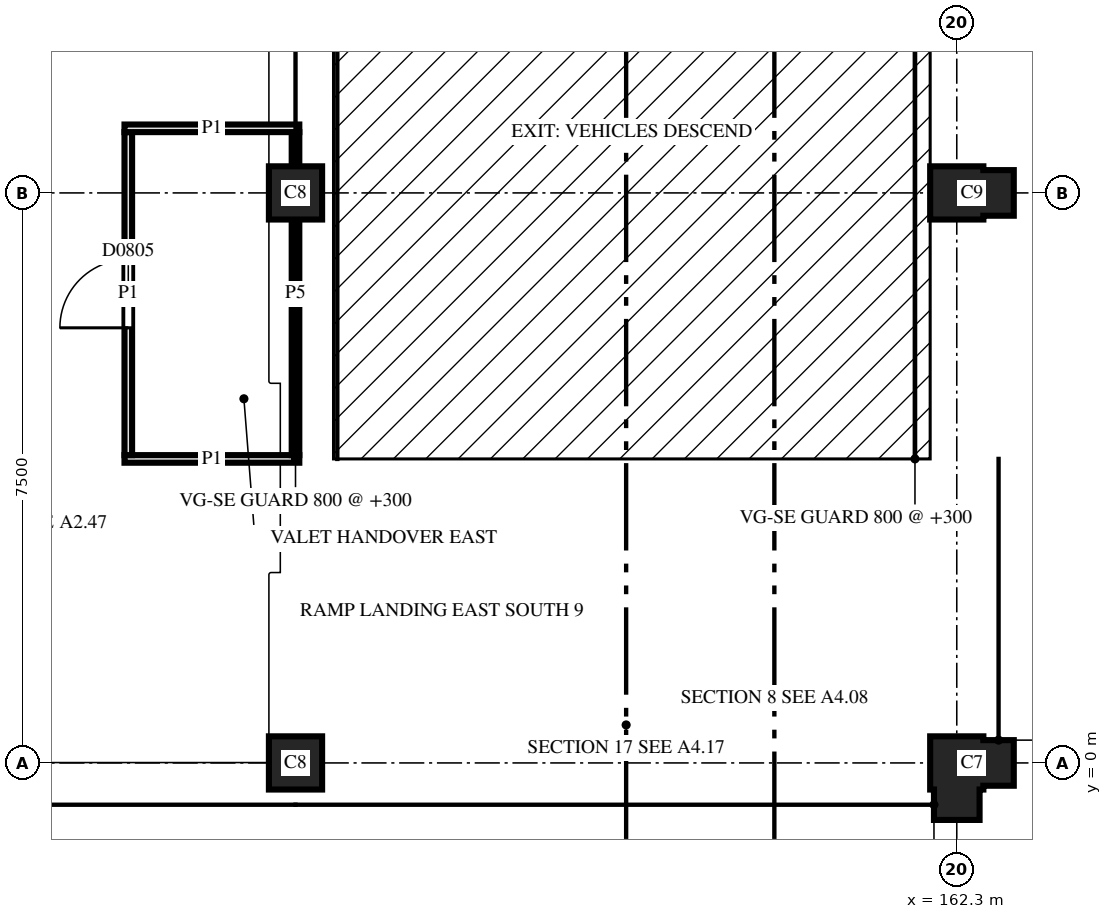
"""IFC4 building model, lengths in metres.
Left out: names, types, materials, properties, quantities, classifications, styles, units other than length and angle.
Written with IfcOpenShell. Run it as: python <this file> out.ifc"""

import sys

from ifc_helpers import new_model, si_unit, direction, frame, frame_2d, origin, place, context, subcontext, project, spatial, polyline, rectangle, outline, extrude, element, fill, save


model = new_model("IFC4")
c1 = context("Model", 3, precision=1e-05, world=origin(), true_north=direction((0.0, 1.0)))
c2 = subcontext(c1, "Body", "Model", "MODEL_VIEW")
j1 = project(units=[si_unit("LENGTHUNIT", "METRE"), si_unit("PLANEANGLEUNIT", "RADIAN")], contexts=[c1])
p1 = place(None, origin())
s1 = spatial("IfcSite", under=j1, at=p1, CompositionType="ELEMENT")
p2 = place(p1, origin())
s2 = spatial("IfcBuilding", under=s1, at=p2, CompositionType="ELEMENT")
p3 = place(p2, frame((0.0, 0.0, 30.4)))
s3 = spatial("IfcBuildingStorey", under=s2, at=p3, CompositionType="ELEMENT", Elevation=30.4)
p4 = place(p3, frame((153.6, 0.0, 0.0), z_axis=(0.0, 0.0, 1.0), x_axis=(1.0, 0.0, 0.0)))
e1 = element("IfcColumn", 1, at=p4, inside=s3, PredefinedType="COLUMN", context=c2, shape_type="SweptSolid", body=[
    extrude(outline(polyline([(-0.35, -0.35), (0.35, -0.35), (0.35, 0.35), (-0.35, 0.35), (-0.35, -0.35)])), origin(), (0.0, 0.0, 1.0), 3.7),
])
p5 = place(p3, frame((162.3, 0.0, 0.0), z_axis=(0.0, 0.0, 1.0), x_axis=(0.0, -1.0, 0.0)))
e2 = element("IfcColumn", 2, at=p5, inside=s3, PredefinedType="COLUMN", context=c2, shape_type="SweptSolid", body=[
    extrude(outline(polyline([(-0.35, -0.35), (0.35, -0.35), (0.35, -0.3), (0.75, -0.3), (0.75, 0.3), (0.35, 0.3), (0.35, 0.35), (0.3, 0.35), (0.3, 0.75), (-0.3, 0.75), (-0.3, 0.35), (-0.35, 0.35), (-0.35, -0.35)])), origin(), (0.0, 0.0, 1.0), 3.7),
])
p6 = place(p3, frame((153.6, 7.5, 0.0), z_axis=(0.0, 0.0, 1.0), x_axis=(1.0, 0.0, 0.0)))
e3 = element("IfcColumn", 3, at=p6, inside=s3, PredefinedType="COLUMN", context=c2, shape_type="SweptSolid", body=[
    extrude(outline(polyline([(-0.35, -0.35), (0.35, -0.35), (0.35, 0.35), (-0.35, 0.35), (-0.35, -0.35)])), origin(), (0.0, 0.0, 1.0), 3.7),
])
p7 = place(p3, frame((162.3, 7.5, 0.0), z_axis=(0.0, 0.0, 1.0), x_axis=(1.0, 0.0, 0.0)))
e4 = element("IfcColumn", 4, at=p7, inside=s3, PredefinedType="COLUMN", context=c2, shape_type="SweptSolid", body=[
    extrude(outline(polyline([(-0.35, -0.35), (0.35, -0.35), (0.35, -0.3), (0.75, -0.3), (0.75, 0.3), (0.35, 0.3), (0.35, 0.35), (-0.35, 0.35), (-0.35, -0.35)])), origin(), (0.0, 0.0, 1.0), 3.7),
])
p8 = place(p3, frame((151.35, 4.0, 0.0), z_axis=(0.0, 0.0, 1.0), x_axis=(1.0, 0.0, 0.0)))
e5 = element("IfcWall", 5, at=p8, inside=s3, PredefinedType="PARTITIONING", context=c2, shape_type="SweptSolid", body=[
    extrude(rectangle(XDim=2.3, YDim=0.1, at=frame_2d((1.15, 0.0))), origin(), (0.0, 0.0, 1.0), 2.88),
])
p9 = place(p3, frame((153.6, 4.05, 0.0), z_axis=(0.0, 0.0, 1.0), x_axis=(0.0, 1.0, 0.0)))
e6 = element("IfcWall", 6, at=p9, inside=s3, PredefinedType="PARTITIONING", context=c2, shape_type="SweptSolid", body=[
    extrude(rectangle(XDim=4.25, YDim=0.1, at=frame_2d((2.125, 0.0))), origin(), (0.0, 0.0, 1.0), 2.6),
])
p10 = place(p3, frame((151.4, 8.3, 0.0), z_axis=(0.0, 0.0, 1.0), x_axis=(0.0, -1.0, 0.0)))
e7 = element("IfcWall", 7, at=p10, inside=s3, PredefinedType="PARTITIONING", context=c2, shape_type="SweptSolid", body=[
    extrude(rectangle(XDim=4.25, YDim=0.1, at=frame_2d((2.125, 0.0))), origin(), (0.0, 0.0, 1.0), 2.88),
])
p11 = place(p10, frame((1.675, 0.0, 0.0)))
e8 = element("IfcOpeningElement", 8, at=p11, cuts=e7, PredefinedType="OPENING", context=c2, shape_type="SweptSolid", body=[
    extrude(rectangle(XDim=0.9, YDim=2.1, at=frame_2d((0.45, 1.05))), frame((0.0, 0.06, 0.0), z_axis=(0.0, -1.0, 0.0), x_axis=(1.0, 0.0, 0.0)), (0.0, 0.0, 1.0), 0.12),
])
p12 = place(p3, frame((153.65, 8.35, 0.0), z_axis=(0.0, 0.0, 1.0), x_axis=(-1.0, 0.0, 0.0)))
e9 = element("IfcWall", 9, at=p12, inside=s3, PredefinedType="PARTITIONING", context=c2, shape_type="SweptSolid", body=[
    extrude(rectangle(XDim=2.3, YDim=0.1, at=frame_2d((1.15, 0.0))), origin(), (0.0, 0.0, 1.0), 2.88),
])
p13 = place(p11, origin())
e10 = element("IfcDoor", 10, at=p13, inside=s3, OperationType="SINGLE_SWING_RIGHT", PredefinedType="DOOR", context=c2, shape_type="SweptSolid", body=[
    extrude(rectangle(XDim=0.9, YDim=2.1, at=frame_2d((0.45, 1.05))), frame((0.0, 0.025, 0.0), z_axis=(0.0, -1.0, 0.0), x_axis=(1.0, 0.0, 0.0)), (0.0, 0.0, 1.0), 0.05),
])
fill(e8, e10)
save(model, sys.argv[1])
